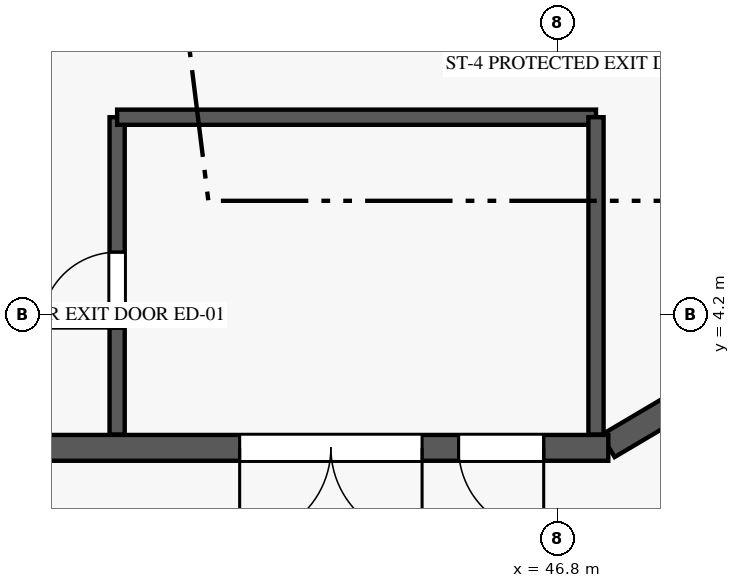
"""IFC4 building model, lengths in metres.
Left out: names, types, materials, properties, quantities, classifications, styles, units other than length and angle.
Written with IfcOpenShell. Run it as: python <this file> out.ifc"""

import sys

from ifc_helpers import new_model, si_unit, direction, frame, frame_2d, origin, origin_2d, place, context, subcontext, project, spatial, rectangle, extrude, element, fill, save


model = new_model("IFC4")
c1 = context("Model", 3, precision=1e-05, world=origin(), true_north=direction((0.0, 1.0)))
c2 = subcontext(c1, "Body", "Model", "MODEL_VIEW")
j1 = project(units=[si_unit("LENGTHUNIT", "METRE"), si_unit("PLANEANGLEUNIT", "RADIAN")], contexts=[c1])
p1 = place(None, origin())
s1 = spatial("IfcSite", under=j1, at=p1, CompositionType="ELEMENT")
p2 = place(p1, origin())
s2 = spatial("IfcBuilding", under=s1, at=p2, CompositionType="ELEMENT")
p3 = place(p2, origin())
s3 = spatial("IfcBuildingStorey", under=s2, at=p3, CompositionType="ELEMENT", Elevation=0.0)
p4 = place(p3, frame((41.245, 1.317, 0.0), z_axis=(0.0, 0.0, 1.0), x_axis=(1.0, 0.0, 0.0)))
e1 = element("IfcColumn", 1, at=p4, inside=s3, PredefinedType="COLUMN", context=c2, shape_type="SweptSolid", body=[
    extrude(rectangle(XDim=1.8, YDim=1.8, at=origin_2d()), origin(), (0.0, 0.0, 1.0), 6.0),
])
p5 = place(p3, frame((41.0, 2.625, 0.0), z_axis=(0.0, 0.0, 1.0), x_axis=(0.0, 1.0, 0.0)))
e2 = element("IfcWall", 2, at=p5, inside=s3, PredefinedType="PLUMBINGWALL", context=c2, shape_type="SweptSolid", body=[
    extrude(rectangle(XDim=4.175, YDim=0.2, at=frame_2d((2.087, 0.0))), origin(), (0.0, 0.0, 1.0), 5.75),
])
p6 = place(p5, frame((1.4, 0.0, 0.0)))
e3 = element("IfcOpeningElement", 3, at=p6, cuts=e2, PredefinedType="OPENING", context=c2, shape_type="SweptSolid", body=[
    extrude(rectangle(XDim=1.0, YDim=2.15, at=frame_2d((0.5, 1.075))), frame((0.0, 0.11, 0.0), z_axis=(0.0, -1.0, 0.0), x_axis=(1.0, 0.0, 0.0)), (0.0, 0.0, 1.0), 0.22),
])
p7 = place(p3, frame((41.0, 6.8, 0.0), z_axis=(0.0, 0.0, 1.0), x_axis=(1.0, 0.0, 0.0)))
e4 = element("IfcWall", 4, at=p7, inside=s3, PredefinedType="PLUMBINGWALL", context=c2, shape_type="SweptSolid", body=[
    extrude(rectangle(XDim=6.3, YDim=0.2, at=frame_2d((3.15, 0.0))), origin(), (0.0, 0.0, 1.0), 5.75),
])
p8 = place(p3, frame((47.3, 2.625, 0.0), z_axis=(0.0, 0.0, 1.0), x_axis=(0.0, 1.0, 0.0)))
e5 = element("IfcWall", 5, at=p8, inside=s3, PredefinedType="PLUMBINGWALL", context=c2, shape_type="SweptSolid", body=[
    extrude(rectangle(XDim=4.175, YDim=0.2, at=frame_2d((2.087, 0.0))), origin(), (0.0, 0.0, 1.0), 5.75),
])
p9 = place(p3, frame((49.375, 3.608, 0.0), z_axis=(0.0, 0.0, 1.0), x_axis=(-0.860917796935, -0.508744087848, 0.0)))
e6 = element("IfcWall", 6, at=p9, inside=s3, PredefinedType="STANDARD", context=c2, shape_type="SweptSolid", body=[
    extrude(rectangle(XDim=2.227, YDim=0.34, at=frame_2d((1.113, 0.0))), origin(), (0.0, 0.0, 1.0), 5.75),
])
p10 = place(p3, frame((47.462, 2.45, 0.0), z_axis=(0.0, 0.0, 1.0), x_axis=(-1.0, 0.0, 0.0)))
e7 = element("IfcWall", 7, at=p10, inside=s3, PredefinedType="STANDARD", context=c2, shape_type="SweptSolid", body=[
    extrude(rectangle(XDim=13.255, YDim=0.34, at=frame_2d((6.627, 0.0))), origin(), (0.0, 0.0, 1.0), 5.75),
])
p11 = place(p10, frame((2.45, 0.0, 0.0)))
e8 = element("IfcOpeningElement", 8, at=p11, cuts=e7, PredefinedType="OPENING", context=c2, shape_type="SweptSolid", body=[
    extrude(rectangle(XDim=2.4, YDim=2.7, at=frame_2d((1.2, 1.35))), frame((0.0, 0.18, 0.0), z_axis=(0.0, -1.0, 0.0), x_axis=(1.0, 0.0, 0.0)), (0.0, 0.0, 1.0), 0.36),
])
p12 = place(p10, frame((0.85, 0.0, 0.0)))
e9 = element("IfcOpeningElement", 9, at=p12, cuts=e7, PredefinedType="OPENING", context=c2, shape_type="SweptSolid", body=[
    extrude(rectangle(XDim=1.12, YDim=2.2, at=frame_2d((0.56, 1.1))), frame((0.0, 0.18, 0.0), z_axis=(0.0, -1.0, 0.0), x_axis=(1.0, 0.0, 0.0)), (0.0, 0.0, 1.0), 0.36),
])
p13 = place(p6, origin())
e10 = element("IfcDoor", 10, at=p13, inside=s3, OperationType="SINGLE_SWING_LEFT", PredefinedType="DOOR", context=c2, shape_type="SweptSolid", body=[
    extrude(rectangle(XDim=1.0, YDim=2.15, at=frame_2d((0.5, 1.075))), frame((0.0, 0.025, 0.0), z_axis=(0.0, -1.0, 0.0), x_axis=(1.0, 0.0, 0.0)), (0.0, 0.0, 1.0), 0.05),
])
fill(e3, e10)
p14 = place(p11, origin())
e11 = element("IfcDoor", 11, at=p14, inside=s3, OperationType="DOUBLE_DOOR_SINGLE_SWING", PredefinedType="DOOR", context=c2, shape_type="SweptSolid", body=[
    extrude(rectangle(XDim=2.4, YDim=2.7, at=frame_2d((1.2, 1.35))), frame((0.0, 0.025, 0.0), z_axis=(0.0, -1.0, 0.0), x_axis=(1.0, 0.0, 0.0)), (0.0, 0.0, 1.0), 0.05),
])
fill(e8, e11)
p15 = place(p12, origin())
e12 = element("IfcDoor", 12, at=p15, inside=s3, OperationType="SINGLE_SWING_LEFT", PredefinedType="DOOR", context=c2, shape_type="SweptSolid", body=[
    extrude(rectangle(XDim=1.12, YDim=2.2, at=frame_2d((0.56, 1.1))), frame((0.0, 0.025, 0.0), z_axis=(0.0, -1.0, 0.0), x_axis=(1.0, 0.0, 0.0)), (0.0, 0.0, 1.0), 0.05),
])
fill(e9, e12)
save(model, sys.argv[1])
